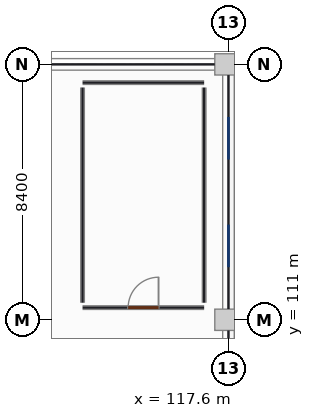
"""IFC4 building model, lengths in metres.
Left out: names, types, materials, properties, quantities, classifications, styles, units other than length and angle.
Written with IfcOpenShell. Run it as: python <this file> out.ifc"""

import sys

from ifc_helpers import new_model, si_unit, direction, frame, frame_2d, origin, origin_2d, place, context, subcontext, project, spatial, rectangle, extrude, element, fill, save


model = new_model("IFC4")
c1 = context("Model", 3, precision=1e-05, world=origin(), true_north=direction((0.0, 1.0)))
c2 = subcontext(c1, "Body", "Model", "MODEL_VIEW")
j1 = project(units=[si_unit("LENGTHUNIT", "METRE"), si_unit("PLANEANGLEUNIT", "RADIAN")], contexts=[c1])
p1 = place(None, origin())
s1 = spatial("IfcSite", under=j1, at=p1, CompositionType="ELEMENT")
p2 = place(p1, origin())
s2 = spatial("IfcBuilding", under=s1, at=p2, CompositionType="ELEMENT")
p3 = place(p2, origin())
s3 = spatial("IfcBuildingStorey", under=s2, at=p3, CompositionType="ELEMENT", Elevation=0.0)
for number, where, z_axis, x_axis in (
    (1, (117.6, 111.0, 0.0), (0.0, 0.0, 1.0), (1.0, 0.0, 0.0)),
    (2, (117.6, 119.4, 0.0), (0.0, 0.0, 1.0), (1.0, 0.0, 0.0)),
):
    element("IfcColumn", number, at=place(p3, frame(where, z_axis=z_axis, x_axis=x_axis)), inside=s3, PredefinedType="COLUMN", context=c2, shape_type="SweptSolid", body=[
        extrude(rectangle(XDim=0.9, YDim=0.7, at=origin_2d()), origin(), (0.0, 0.0, 1.0), 5.08),
    ])
p4 = place(p3, frame((108.452, 119.4, 0.0), z_axis=(0.0, 0.0, 1.0), x_axis=(1.0, 0.0, 0.0)))
e3 = element("IfcWall", 3, at=p4, inside=s3, PredefinedType="SOLIDWALL", context=c2, shape_type="SweptSolid", body=[
    extrude(rectangle(XDim=8.696, YDim=0.38, at=frame_2d((4.348, 0.0))), origin(), (0.0, 0.0, 1.0), 4.28),
])
p5 = place(p4, frame((1.398, 0.0, 0.0)))
e4 = element("IfcOpeningElement", 4, at=p5, cuts=e3, PredefinedType="OPENING", context=c2, shape_type="SweptSolid", body=[
    extrude(rectangle(XDim=1.5, YDim=2.2, at=frame_2d((0.75, 1.1))), frame((0.0, 0.2, 0.0), z_axis=(0.0, -1.0, 0.0), x_axis=(1.0, 0.0, 0.0)), (0.0, 0.0, 1.0), 0.4),
])
p6 = place(p3, frame((117.6, 102.952, 0.0), z_axis=(0.0, 0.0, 1.0), x_axis=(0.0, 1.0, 0.0)))
e5 = element("IfcWall", 5, at=p6, inside=s3, PredefinedType="SOLIDWALL", context=c2, shape_type="SweptSolid", body=[
    extrude(rectangle(XDim=7.696, YDim=0.38, at=frame_2d((3.848, 0.0))), origin(), (0.0, 0.0, 1.0), 4.28),
])
p7 = place(p6, frame((1.378, 0.0, 0.85)))
e6 = element("IfcOpeningElement", 6, at=p7, cuts=e5, PredefinedType="OPENING", context=c2, shape_type="SweptSolid", body=[
    extrude(rectangle(XDim=1.4, YDim=1.65, at=frame_2d((0.7, 0.825))), frame((0.0, 0.2, 0.0), z_axis=(0.0, -1.0, 0.0), x_axis=(1.0, 0.0, 0.0)), (0.0, 0.0, 1.0), 0.4),
])
p8 = place(p6, frame((4.918, 0.0, 0.85)))
e7 = element("IfcOpeningElement", 7, at=p8, cuts=e5, PredefinedType="OPENING", context=c2, shape_type="SweptSolid", body=[
    extrude(rectangle(XDim=1.4, YDim=1.65, at=frame_2d((0.7, 0.825))), frame((0.0, 0.2, 0.0), z_axis=(0.0, -1.0, 0.0), x_axis=(1.0, 0.0, 0.0)), (0.0, 0.0, 1.0), 0.4),
])
p9 = place(p3, frame((117.6, 111.352, 0.0), z_axis=(0.0, 0.0, 1.0), x_axis=(0.0, 1.0, 0.0)))
e8 = element("IfcWall", 8, at=p9, inside=s3, PredefinedType="SOLIDWALL", context=c2, shape_type="SweptSolid", body=[
    extrude(rectangle(XDim=7.696, YDim=0.38, at=frame_2d((3.848, 0.0))), origin(), (0.0, 0.0, 1.0), 4.28),
])
p10 = place(p9, frame((1.378, 0.0, 0.85)))
e9 = element("IfcOpeningElement", 9, at=p10, cuts=e8, PredefinedType="OPENING", context=c2, shape_type="SweptSolid", body=[
    extrude(rectangle(XDim=1.4, YDim=1.65, at=frame_2d((0.7, 0.825))), frame((0.0, 0.2, 0.0), z_axis=(0.0, -1.0, 0.0), x_axis=(1.0, 0.0, 0.0)), (0.0, 0.0, 1.0), 0.4),
])
p11 = place(p9, frame((4.918, 0.0, 0.85)))
e10 = element("IfcOpeningElement", 10, at=p11, cuts=e8, PredefinedType="OPENING", context=c2, shape_type="SweptSolid", body=[
    extrude(rectangle(XDim=1.4, YDim=1.65, at=frame_2d((0.7, 0.825))), frame((0.0, 0.2, 0.0), z_axis=(0.0, -1.0, 0.0), x_axis=(1.0, 0.0, 0.0)), (0.0, 0.0, 1.0), 0.4),
])
p12 = place(p3, frame((112.8, 111.4, 0.0), z_axis=(0.0, 0.0, 1.0), x_axis=(1.0, 0.0, 0.0)))
e11 = element("IfcWall", 11, at=p12, inside=s3, PredefinedType="PARTITIONING", context=c2, shape_type="SweptSolid", body=[
    extrude(rectangle(XDim=4.0, YDim=0.12, at=frame_2d((2.0, 0.0))), origin(), (0.0, 0.0, 1.0), 4.12),
])
p13 = place(p12, frame((1.5, 0.0, 0.0)))
e12 = element("IfcOpeningElement", 12, at=p13, cuts=e11, PredefinedType="OPENING", context=c2, shape_type="SweptSolid", body=[
    extrude(rectangle(XDim=1.0, YDim=2.15, at=frame_2d((0.5, 1.075))), frame((0.0, 0.07, 0.0), z_axis=(0.0, -1.0, 0.0), x_axis=(1.0, 0.0, 0.0)), (0.0, 0.0, 1.0), 0.14),
])
p14 = place(p3, frame((112.8, 118.8, 0.0), z_axis=(0.0, 0.0, 1.0), x_axis=(1.0, 0.0, 0.0)))
e13 = element("IfcWall", 13, at=p14, inside=s3, PredefinedType="PARTITIONING", context=c2, shape_type="SweptSolid", body=[
    extrude(rectangle(XDim=4.0, YDim=0.12, at=frame_2d((2.0, 0.0))), origin(), (0.0, 0.0, 1.0), 4.12),
])
for number, where, z_axis, x_axis in (
    (14, (112.8, 111.56, 0.0), (0.0, 0.0, 1.0), (0.0, 1.0, 0.0)),
    (15, (116.8, 111.56, 0.0), (0.0, 0.0, 1.0), (0.0, 1.0, 0.0)),
):
    element("IfcWall", number, at=place(p3, frame(where, z_axis=z_axis, x_axis=x_axis)), inside=s3, PredefinedType="PARTITIONING", context=c2, shape_type="SweptSolid", body=[
        extrude(rectangle(XDim=7.08, YDim=0.12, at=frame_2d((3.54, 0.0))), origin(), (0.0, 0.0, 1.0), 4.12),
    ])
p15 = place(p10, origin())
e16 = element("IfcWindow", 16, at=p15, inside=s3, PartitioningType="SINGLE_PANEL", PredefinedType="WINDOW", context=c2, shape_type="SweptSolid", body=[
    extrude(rectangle(XDim=1.4, YDim=1.65, at=frame_2d((0.7, 0.825))), frame((0.0, 0.03, 0.0), z_axis=(0.0, -1.0, 0.0), x_axis=(1.0, 0.0, 0.0)), (0.0, 0.0, 1.0), 0.06),
])
fill(e9, e16)
p16 = place(p11, origin())
e17 = element("IfcWindow", 17, at=p16, inside=s3, PartitioningType="SINGLE_PANEL", PredefinedType="WINDOW", context=c2, shape_type="SweptSolid", body=[
    extrude(rectangle(XDim=1.4, YDim=1.65, at=frame_2d((0.7, 0.825))), frame((0.0, 0.03, 0.0), z_axis=(0.0, -1.0, 0.0), x_axis=(1.0, 0.0, 0.0)), (0.0, 0.0, 1.0), 0.06),
])
fill(e10, e17)
p17 = place(p13, origin())
e18 = element("IfcDoor", 18, at=p17, inside=s3, OperationType="SINGLE_SWING_RIGHT", PredefinedType="DOOR", context=c2, shape_type="SweptSolid", body=[
    extrude(rectangle(XDim=1.0, YDim=2.15, at=frame_2d((0.5, 1.075))), frame((0.0, 0.025, 0.0), z_axis=(0.0, -1.0, 0.0), x_axis=(1.0, 0.0, 0.0)), (0.0, 0.0, 1.0), 0.05),
])
fill(e12, e18)
save(model, sys.argv[1])
